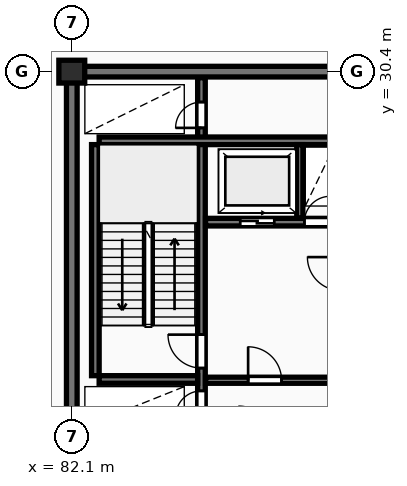
"""IFC4 building model, lengths in metres.
Left out: names, types, materials, properties, quantities, classifications, styles, units other than length and angle.
Written with IfcOpenShell. Run it as: python <this file> out.ifc"""

import sys

from ifc_helpers import new_model, si_unit, direction, frame, frame_2d, origin, origin_2d, place, context, subcontext, project, spatial, rectangle, extrude, element, fill, save


model = new_model("IFC4")
c1 = context("Model", 3, precision=1e-05, world=origin(), true_north=direction((0.0, 1.0)))
c2 = subcontext(c1, "Body", "Model", "MODEL_VIEW")
j1 = project(units=[si_unit("LENGTHUNIT", "METRE"), si_unit("PLANEANGLEUNIT", "RADIAN")], contexts=[c1])
p1 = place(None, origin())
s1 = spatial("IfcSite", under=j1, at=p1, CompositionType="ELEMENT")
p2 = place(p1, origin())
s2 = spatial("IfcBuilding", under=s1, at=p2, CompositionType="ELEMENT")
p3 = place(p2, frame((0.0, 0.0, 157.3)))
s3 = spatial("IfcBuildingStorey", under=s2, at=p3, CompositionType="ELEMENT", Elevation=157.3)
p4 = place(p3, frame((82.1, 30.4, 0.0), z_axis=(0.0, 0.0, 1.0), x_axis=(1.0, 0.0, 0.0)))
e1 = element("IfcColumn", 1, at=p4, inside=s3, PredefinedType="COLUMN", context=c2, shape_type="SweptSolid", body=[
    extrude(rectangle(XDim=0.85, YDim=0.75, at=origin_2d()), origin(), (0.0, 0.0, 1.0), 4.8),
])
p5 = place(p3, frame((81.925, 30.4, 0.0), z_axis=(0.0, 0.0, 1.0), x_axis=(1.0, 0.0, 0.0)))
e2 = element("IfcWall", 2, at=p5, inside=s3, PredefinedType="SHEAR", context=c2, shape_type="SweptSolid", body=[
    extrude(rectangle(XDim=36.265, YDim=0.35, at=frame_2d((18.132, 0.0))), origin(), (0.0, 0.0, 1.0), 4.8),
])
p6 = place(p3, frame((82.1, 18.575, 0.0), z_axis=(0.0, 0.0, 1.0), x_axis=(0.0, 1.0, 0.0)))
e3 = element("IfcWall", 3, at=p6, inside=s3, PredefinedType="SHEAR", context=c2, shape_type="SweptSolid", body=[
    extrude(rectangle(XDim=11.65, YDim=0.35, at=frame_2d((5.825, 0.0))), origin(), (0.0, 0.0, 1.0), 4.8),
])
p7 = place(p3, frame((82.875, 20.4, 0.0), z_axis=(0.0, 0.0, 1.0), x_axis=(0.0, 1.0, 0.0)))
e4 = element("IfcWall", 4, at=p7, inside=s3, PredefinedType="SHEAR", context=c2, shape_type="SweptSolid", body=[
    extrude(rectangle(XDim=7.6, YDim=0.25, at=frame_2d((3.8, 0.0))), origin(), (0.0, 0.0, 1.0), 4.8),
])
p8 = place(p3, frame((86.365, 18.6, 0.0), z_axis=(0.0, 0.0, 1.0), x_axis=(0.0, 1.0, 0.0)))
e5 = element("IfcWall", 5, at=p8, inside=s3, PredefinedType="SHEAR", context=c2, shape_type="SweptSolid", body=[
    extrude(rectangle(XDim=11.6, YDim=0.25, at=frame_2d((5.8, 0.0))), origin(), (0.0, 0.0, 1.0), 4.8),
])
p9 = place(p8, frame((0.45, 0.0, 0.0)))
e6 = element("IfcOpeningElement", 6, at=p9, cuts=e5, PredefinedType="OPENING", context=c2, shape_type="SweptSolid", body=[
    extrude(rectangle(XDim=0.85, YDim=2.05, at=frame_2d((0.425, 1.025))), frame((0.0, 0.135, 0.0), z_axis=(0.0, -1.0, 0.0), x_axis=(1.0, 0.0, 0.0)), (0.0, 0.0, 1.0), 0.27),
])
p10 = place(p8, frame((2.05, 0.0, 0.0)))
e7 = element("IfcOpeningElement", 7, at=p10, cuts=e5, PredefinedType="OPENING", context=c2, shape_type="SweptSolid", body=[
    extrude(rectangle(XDim=1.1, YDim=2.1, at=frame_2d((0.55, 1.05))), frame((0.0, 0.135, 0.0), z_axis=(0.0, -1.0, 0.0), x_axis=(1.0, 0.0, 0.0)), (0.0, 0.0, 1.0), 0.27),
])
p11 = place(p8, frame((9.95, 0.0, 0.0)))
e8 = element("IfcOpeningElement", 8, at=p11, cuts=e5, PredefinedType="OPENING", context=c2, shape_type="SweptSolid", body=[
    extrude(rectangle(XDim=0.85, YDim=2.05, at=frame_2d((0.425, 1.025))), frame((0.0, 0.135, 0.0), z_axis=(0.0, -1.0, 0.0), x_axis=(1.0, 0.0, 0.0)), (0.0, 0.0, 1.0), 0.27),
])
p12 = place(p3, frame((83.0, 20.275, 0.0), z_axis=(0.0, 0.0, 1.0), x_axis=(1.0, 0.0, 0.0)))
e9 = element("IfcWall", 9, at=p12, inside=s3, PredefinedType="SHEAR", context=c2, shape_type="SweptSolid", body=[
    extrude(rectangle(XDim=3.24, YDim=0.25, at=frame_2d((1.62, 0.0))), origin(), (0.0, 0.0, 1.0), 4.8),
])
p13 = place(p3, frame((83.0, 28.125, 0.0), z_axis=(0.0, 0.0, 1.0), x_axis=(1.0, 0.0, 0.0)))
e10 = element("IfcWall", 10, at=p13, inside=s3, PredefinedType="SHEAR", context=c2, shape_type="SweptSolid", body=[
    extrude(rectangle(XDim=7.82, YDim=0.25, at=frame_2d((3.91, 0.0))), origin(), (0.0, 0.0, 1.0), 4.8),
])
p14 = place(p3, frame((86.5, 25.45, 0.0), z_axis=(0.0, 0.0, 1.0), x_axis=(1.0, 0.0, 0.0)))
e11 = element("IfcWall", 11, at=p14, inside=s3, PredefinedType="SHEAR", context=c2, shape_type="SweptSolid", body=[
    extrude(rectangle(XDim=4.32, YDim=0.25, at=frame_2d((2.16, 0.0))), origin(), (0.0, 0.0, 1.0), 4.8),
])
p15 = place(p14, frame((1.14, 0.0, 0.0)))
e12 = element("IfcOpeningElement", 12, at=p15, cuts=e11, PredefinedType="OPENING", context=c2, shape_type="SweptSolid", body=[
    extrude(rectangle(XDim=1.12, YDim=2.12, at=frame_2d((0.56, 1.06))), frame((0.0, 0.135, 0.0), z_axis=(0.0, -1.0, 0.0), x_axis=(1.0, 0.0, 0.0)), (0.0, 0.0, 1.0), 0.27),
])
p16 = place(p14, frame((3.25, 0.0, 0.0)))
e13 = element("IfcOpeningElement", 13, at=p16, cuts=e11, PredefinedType="OPENING", context=c2, shape_type="SweptSolid", body=[
    extrude(rectangle(XDim=0.85, YDim=2.05, at=frame_2d((0.425, 1.025))), frame((0.0, 0.135, 0.0), z_axis=(0.0, -1.0, 0.0), x_axis=(1.0, 0.0, 0.0)), (0.0, 0.0, 1.0), 0.27),
])
p17 = place(p3, frame((89.6, 25.58, 0.0), z_axis=(0.0, 0.0, 1.0), x_axis=(0.0, 1.0, 0.0)))
e14 = element("IfcWall", 14, at=p17, inside=s3, PredefinedType="PARTITIONING", context=c2, shape_type="SweptSolid", body=[
    extrude(rectangle(XDim=2.42, YDim=0.2, at=frame_2d((1.21, 0.0))), origin(), (0.0, 0.0, 1.0), 4.48),
])
p18 = place(p3, frame((86.5, 20.25, 0.0), z_axis=(0.0, 0.0, 1.0), x_axis=(1.0, 0.0, 0.0)))
e15 = element("IfcWall", 15, at=p18, inside=s3, PredefinedType="PARTITIONING", context=c2, shape_type="SweptSolid", body=[
    extrude(rectangle(XDim=4.32, YDim=0.2, at=frame_2d((2.16, 0.0))), origin(), (0.0, 0.0, 1.0), 4.48),
])
p19 = place(p18, frame((1.4, 0.0, 0.0)))
e16 = element("IfcOpeningElement", 16, at=p19, cuts=e15, PredefinedType="OPENING", context=c2, shape_type="SweptSolid", body=[
    extrude(rectangle(XDim=1.1, YDim=2.1, at=frame_2d((0.55, 1.05))), frame((0.0, 0.11, 0.0), z_axis=(0.0, -1.0, 0.0), x_axis=(1.0, 0.0, 0.0)), (0.0, 0.0, 1.0), 0.22),
])
p20 = place(p9, origin())
e17 = element("IfcDoor", 17, at=p20, inside=s3, OperationType="SINGLE_SWING_LEFT", PredefinedType="DOOR", context=c2, shape_type="SweptSolid", body=[
    extrude(rectangle(XDim=0.85, YDim=2.05, at=frame_2d((0.425, 1.025))), frame((0.0, 0.025, 0.0), z_axis=(0.0, -1.0, 0.0), x_axis=(1.0, 0.0, 0.0)), (0.0, 0.0, 1.0), 0.05),
])
fill(e6, e17)
p21 = place(p10, origin())
e18 = element("IfcDoor", 18, at=p21, inside=s3, OperationType="SINGLE_SWING_RIGHT", PredefinedType="DOOR", context=c2, shape_type="SweptSolid", body=[
    extrude(rectangle(XDim=1.1, YDim=2.1, at=frame_2d((0.55, 1.05))), frame((0.0, 0.025, 0.0), z_axis=(0.0, -1.0, 0.0), x_axis=(1.0, 0.0, 0.0)), (0.0, 0.0, 1.0), 0.05),
])
fill(e7, e18)
p22 = place(p11, origin())
e19 = element("IfcDoor", 19, at=p22, inside=s3, OperationType="SINGLE_SWING_LEFT", PredefinedType="DOOR", context=c2, shape_type="SweptSolid", body=[
    extrude(rectangle(XDim=0.85, YDim=2.05, at=frame_2d((0.425, 1.025))), frame((0.0, 0.025, 0.0), z_axis=(0.0, -1.0, 0.0), x_axis=(1.0, 0.0, 0.0)), (0.0, 0.0, 1.0), 0.05),
])
fill(e8, e19)
p23 = place(p15, origin())
e20 = element("IfcDoor", 20, at=p23, inside=s3, OperationType="SLIDING_TO_RIGHT", PredefinedType="DOOR", context=c2, shape_type="SweptSolid", body=[
    extrude(rectangle(XDim=1.12, YDim=2.12, at=frame_2d((0.56, 1.06))), frame((0.0, 0.025, 0.0), z_axis=(0.0, -1.0, 0.0), x_axis=(1.0, 0.0, 0.0)), (0.0, 0.0, 1.0), 0.05),
])
fill(e12, e20)
p24 = place(p16, origin())
e21 = element("IfcDoor", 21, at=p24, inside=s3, OperationType="SINGLE_SWING_RIGHT", PredefinedType="DOOR", context=c2, shape_type="SweptSolid", body=[
    extrude(rectangle(XDim=0.85, YDim=2.05, at=frame_2d((0.425, 1.025))), frame((0.0, 0.025, 0.0), z_axis=(0.0, -1.0, 0.0), x_axis=(1.0, 0.0, 0.0)), (0.0, 0.0, 1.0), 0.05),
])
fill(e13, e21)
p25 = place(p19, origin())
e22 = element("IfcDoor", 22, at=p25, inside=s3, OperationType="SINGLE_SWING_LEFT", PredefinedType="DOOR", context=c2, shape_type="SweptSolid", body=[
    extrude(rectangle(XDim=1.1, YDim=2.1, at=frame_2d((0.55, 1.05))), frame((0.0, 0.025, 0.0), z_axis=(0.0, -1.0, 0.0), x_axis=(1.0, 0.0, 0.0)), (0.0, 0.0, 1.0), 0.05),
])
fill(e16, e22)
save(model, sys.argv[1])
